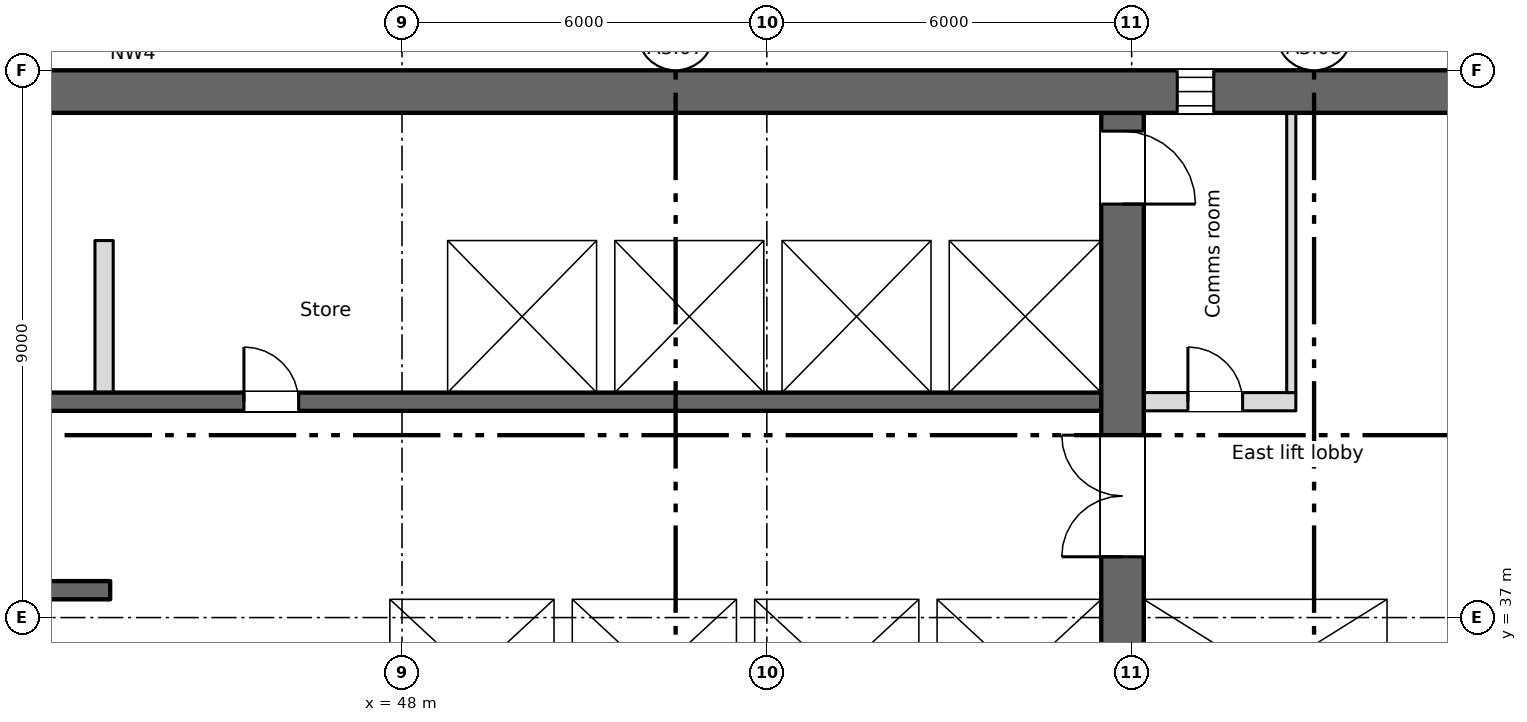
"""IFC4 building model, lengths in metres.
Left out: names, types, materials, properties, quantities, classifications, styles, units other than length and angle.
Written with IfcOpenShell. Run it as: python <this file> out.ifc"""

import sys

from ifc_helpers import new_model, si_unit, direction, frame, frame_2d, origin, place, context, subcontext, project, spatial, rectangle, extrude, element, fill, save


model = new_model("IFC4")
c1 = context("Model", 3, precision=1e-05, world=origin(), true_north=direction((0.0, 1.0)))
c2 = subcontext(c1, "Body", "Model", "MODEL_VIEW")
j1 = project(units=[si_unit("LENGTHUNIT", "METRE"), si_unit("PLANEANGLEUNIT", "RADIAN")], contexts=[c1])
p1 = place(None, origin())
s1 = spatial("IfcSite", under=j1, at=p1, CompositionType="ELEMENT")
p2 = place(p1, origin())
s2 = spatial("IfcBuilding", under=s1, at=p2, CompositionType="ELEMENT")
p3 = place(p2, frame((0.0, 0.0, 185.5)))
s3 = spatial("IfcBuildingStorey", under=s2, at=p3, CompositionType="ELEMENT", Elevation=185.5)
p4 = place(p3, frame((11.55, 45.65, 0.0), z_axis=(0.0, 0.0, 1.0), x_axis=(1.0, 0.0, 0.0)))
e1 = element("IfcWall", 1, at=p4, inside=s3, PredefinedType="SHEAR", context=c2, shape_type="SweptSolid", body=[
    extrude(rectangle(XDim=54.9, YDim=0.7, at=frame_2d((27.45, 0.0))), origin(), (0.0, 0.0, 1.0), 3.35),
])
p5 = place(p4, frame((1.2, 0.0, 0.6)))
e2 = element("IfcOpeningElement", 2, at=p5, cuts=e1, PredefinedType="OPENING", context=c2, shape_type="SweptSolid", body=[
    extrude(rectangle(XDim=0.6, YDim=2.4, at=frame_2d((0.3, 1.2))), frame((0.0, 0.36, 0.0), z_axis=(0.0, -1.0, 0.0), x_axis=(1.0, 0.0, 0.0)), (0.0, 0.0, 1.0), 0.72),
])
p6 = place(p4, frame((49.2, 0.0, 0.6)))
e3 = element("IfcOpeningElement", 3, at=p6, cuts=e1, PredefinedType="OPENING", context=c2, shape_type="SweptSolid", body=[
    extrude(rectangle(XDim=0.6, YDim=2.4, at=frame_2d((0.3, 1.2))), frame((0.0, 0.36, 0.0), z_axis=(0.0, -1.0, 0.0), x_axis=(1.0, 0.0, 0.0)), (0.0, 0.0, 1.0), 0.72),
])
p7 = place(p3, frame((64.35, 34.8, 0.0), z_axis=(0.0, 0.0, 1.0), x_axis=(0.0, 1.0, 0.0)))
e4 = element("IfcWall", 4, at=p7, inside=s3, PredefinedType="SHEAR", context=c2, shape_type="SweptSolid", body=[
    extrude(rectangle(XDim=10.5, YDim=0.3, at=frame_2d((5.25, 0.0))), origin(), (0.0, 0.0, 1.0), 3.35),
])
p8 = place(p3, frame((59.85, 28.4, 0.0), z_axis=(0.0, 0.0, 1.0), x_axis=(0.0, 1.0, 0.0)))
e5 = element("IfcWall", 5, at=p8, inside=s3, PredefinedType="SHEAR", context=c2, shape_type="SweptSolid", body=[
    extrude(rectangle(XDim=16.9, YDim=0.7, at=frame_2d((8.45, 0.0))), origin(), (0.0, 0.0, 1.0), 3.35),
])
p9 = place(p8, frame((9.6, 0.0, 0.0)))
e6 = element("IfcOpeningElement", 6, at=p9, cuts=e5, PredefinedType="OPENING", context=c2, shape_type="SweptSolid", body=[
    extrude(rectangle(XDim=2.0, YDim=2.1, at=frame_2d((1.0, 1.05))), frame((0.0, 0.36, 0.0), z_axis=(0.0, -1.0, 0.0), x_axis=(1.0, 0.0, 0.0)), (0.0, 0.0, 1.0), 0.72),
])
p10 = place(p8, frame((15.4, 0.0, 0.0)))
e7 = element("IfcOpeningElement", 7, at=p10, cuts=e5, PredefinedType="OPENING", context=c2, shape_type="SweptSolid", body=[
    extrude(rectangle(XDim=1.2, YDim=2.1, at=frame_2d((0.6, 1.05))), frame((0.0, 0.36, 0.0), z_axis=(0.0, -1.0, 0.0), x_axis=(1.0, 0.0, 0.0)), (0.0, 0.0, 1.0), 0.72),
])
p11 = place(p3, frame((43.2, 37.45, 0.0), z_axis=(0.0, 0.0, 1.0), x_axis=(-1.0, 0.0, 0.0)))
e8 = element("IfcWall", 8, at=p11, inside=s3, PredefinedType="SHEAR", context=c2, shape_type="SweptSolid", body=[
    extrude(rectangle(XDim=8.4, YDim=0.3, at=frame_2d((4.2, 0.0))), origin(), (0.0, 0.0, 1.0), 3.35),
])
p12 = place(p11, frame((3.75, 0.0, 0.0)))
e9 = element("IfcOpeningElement", 9, at=p12, cuts=e8, PredefinedType="OPENING", context=c2, shape_type="SweptSolid", body=[
    extrude(rectangle(XDim=0.9, YDim=2.1, at=frame_2d((0.45, 1.05))), frame((0.0, 0.16, 0.0), z_axis=(0.0, -1.0, 0.0), x_axis=(1.0, 0.0, 0.0)), (0.0, 0.0, 1.0), 0.32),
])
p13 = place(p3, frame((47.3, 37.45, 0.0), z_axis=(0.0, 0.0, 1.0), x_axis=(1.0, 0.0, 0.0)))
e10 = element("IfcWall", 10, at=p13, inside=s3, PredefinedType="SHEAR", context=c2, shape_type="SweptSolid", body=[
    extrude(rectangle(XDim=12.2, YDim=0.3, at=frame_2d((6.1, 0.0))), origin(), (0.0, 0.0, 1.0), 3.35),
])
p14 = place(p13, frame((4.3, 0.0, 0.0)))
e11 = element("IfcOpeningElement", 11, at=p14, cuts=e10, PredefinedType="OPENING", context=c2, shape_type="SweptSolid", body=[
    extrude(rectangle(XDim=1.1, YDim=2.1, at=frame_2d((0.55, 1.05))), frame((0.0, 0.16, 0.0), z_axis=(0.0, -1.0, 0.0), x_axis=(1.0, 0.0, 0.0)), (0.0, 0.0, 1.0), 0.32),
])
p15 = place(p13, frame((7.3, 0.0, 0.0)))
e12 = element("IfcOpeningElement", 12, at=p15, cuts=e10, PredefinedType="OPENING", context=c2, shape_type="SweptSolid", body=[
    extrude(rectangle(XDim=1.1, YDim=2.1, at=frame_2d((0.55, 1.05))), frame((0.0, 0.16, 0.0), z_axis=(0.0, -1.0, 0.0), x_axis=(1.0, 0.0, 0.0)), (0.0, 0.0, 1.0), 0.32),
])
p16 = place(p13, frame((10.3, 0.0, 0.0)))
e13 = element("IfcOpeningElement", 13, at=p16, cuts=e10, PredefinedType="OPENING", context=c2, shape_type="SweptSolid", body=[
    extrude(rectangle(XDim=1.1, YDim=2.1, at=frame_2d((0.55, 1.05))), frame((0.0, 0.16, 0.0), z_axis=(0.0, -1.0, 0.0), x_axis=(1.0, 0.0, 0.0)), (0.0, 0.0, 1.0), 0.32),
])
p17 = place(p3, frame((60.2, 37.45, 0.0), z_axis=(0.0, 0.0, 1.0), x_axis=(1.0, 0.0, 0.0)))
e14 = element("IfcWall", 14, at=p17, inside=s3, PredefinedType="SHEAR", context=c2, shape_type="SweptSolid", body=[
    extrude(rectangle(XDim=4.0, YDim=0.3, at=frame_2d((2.0, 0.0))), origin(), (0.0, 0.0, 1.0), 3.35),
])
p18 = place(p17, frame((1.45, 0.0, 0.0)))
e15 = element("IfcOpeningElement", 15, at=p18, cuts=e14, PredefinedType="OPENING", context=c2, shape_type="SweptSolid", body=[
    extrude(rectangle(XDim=1.1, YDim=2.1, at=frame_2d((0.55, 1.05))), frame((0.0, 0.16, 0.0), z_axis=(0.0, -1.0, 0.0), x_axis=(1.0, 0.0, 0.0)), (0.0, 0.0, 1.0), 0.32),
])
p19 = place(p3, frame((43.05, 34.8, 0.0), z_axis=(0.0, 0.0, 1.0), x_axis=(0.0, 1.0, 0.0)))
e16 = element("IfcWall", 16, at=p19, inside=s3, PredefinedType="SHEAR", context=c2, shape_type="SweptSolid", body=[
    extrude(rectangle(XDim=2.5, YDim=0.3, at=frame_2d((1.25, 0.0))), origin(), (0.0, 0.0, 1.0), 3.35),
])
p20 = place(p3, frame((47.55, 34.8, 0.0), z_axis=(0.0, 0.0, 1.0), x_axis=(0.0, 1.0, 0.0)))
e17 = element("IfcWall", 17, at=p20, inside=s3, PredefinedType="SHEAR", context=c2, shape_type="SweptSolid", body=[
    extrude(rectangle(XDim=2.5, YDim=0.5, at=frame_2d((1.25, 0.0))), origin(), (0.0, 0.0, 1.0), 3.35),
])
p21 = place(p3, frame((50.65, 34.8, 0.0), z_axis=(0.0, 0.0, 1.0), x_axis=(0.0, 1.0, 0.0)))
e18 = element("IfcWall", 18, at=p21, inside=s3, PredefinedType="SHEAR", context=c2, shape_type="SweptSolid", body=[
    extrude(rectangle(XDim=2.5, YDim=0.3, at=frame_2d((1.25, 0.0))), origin(), (0.0, 0.0, 1.0), 3.35),
])
p22 = place(p3, frame((18.5, 40.55, 0.0), z_axis=(0.0, 0.0, 1.0), x_axis=(1.0, 0.0, 0.0)))
e19 = element("IfcWall", 19, at=p22, inside=s3, PredefinedType="SHEAR", context=c2, shape_type="SweptSolid", body=[
    extrude(rectangle(XDim=41.0, YDim=0.3, at=frame_2d((20.5, 0.0))), origin(), (0.0, 0.0, 1.0), 3.35),
])
p23 = place(p22, frame((2.15, 0.0, 0.0)))
e20 = element("IfcOpeningElement", 20, at=p23, cuts=e19, PredefinedType="OPENING", context=c2, shape_type="SweptSolid", body=[
    extrude(rectangle(XDim=0.9, YDim=2.1, at=frame_2d((0.45, 1.05))), frame((0.0, 0.16, 0.0), z_axis=(0.0, -1.0, 0.0), x_axis=(1.0, 0.0, 0.0)), (0.0, 0.0, 1.0), 0.32),
])
p24 = place(p22, frame((15.9, 0.0, 0.0)))
e21 = element("IfcOpeningElement", 21, at=p24, cuts=e19, PredefinedType="OPENING", context=c2, shape_type="SweptSolid", body=[
    extrude(rectangle(XDim=0.9, YDim=2.1, at=frame_2d((0.45, 1.05))), frame((0.0, 0.16, 0.0), z_axis=(0.0, -1.0, 0.0), x_axis=(1.0, 0.0, 0.0)), (0.0, 0.0, 1.0), 0.32),
])
p25 = place(p22, frame((21.4, 0.0, 0.0)))
e22 = element("IfcOpeningElement", 22, at=p25, cuts=e19, PredefinedType="OPENING", context=c2, shape_type="SweptSolid", body=[
    extrude(rectangle(XDim=0.9, YDim=2.1, at=frame_2d((0.45, 1.05))), frame((0.0, 0.16, 0.0), z_axis=(0.0, -1.0, 0.0), x_axis=(1.0, 0.0, 0.0)), (0.0, 0.0, 1.0), 0.32),
])
p26 = place(p22, frame((26.9, 0.0, 0.0)))
e23 = element("IfcOpeningElement", 23, at=p26, cuts=e19, PredefinedType="OPENING", context=c2, shape_type="SweptSolid", body=[
    extrude(rectangle(XDim=0.9, YDim=2.1, at=frame_2d((0.45, 1.05))), frame((0.0, 0.16, 0.0), z_axis=(0.0, -1.0, 0.0), x_axis=(1.0, 0.0, 0.0)), (0.0, 0.0, 1.0), 0.32),
])
p27 = place(p22, frame((6.175, 0.0, 0.0)))
e24 = element("IfcOpeningElement", 24, at=p27, cuts=e19, PredefinedType="OPENING", context=c2, shape_type="SweptSolid", body=[
    extrude(rectangle(XDim=1.1, YDim=2.1, at=frame_2d((0.55, 1.05))), frame((0.0, 0.16, 0.0), z_axis=(0.0, -1.0, 0.0), x_axis=(1.0, 0.0, 0.0)), (0.0, 0.0, 1.0), 0.32),
])
p28 = place(p22, frame((8.925, 0.0, 0.0)))
e25 = element("IfcOpeningElement", 25, at=p28, cuts=e19, PredefinedType="OPENING", context=c2, shape_type="SweptSolid", body=[
    extrude(rectangle(XDim=1.1, YDim=2.1, at=frame_2d((0.55, 1.05))), frame((0.0, 0.16, 0.0), z_axis=(0.0, -1.0, 0.0), x_axis=(1.0, 0.0, 0.0)), (0.0, 0.0, 1.0), 0.32),
])
p29 = place(p22, frame((11.675, 0.0, 0.0)))
e26 = element("IfcOpeningElement", 26, at=p29, cuts=e19, PredefinedType="OPENING", context=c2, shape_type="SweptSolid", body=[
    extrude(rectangle(XDim=1.1, YDim=2.1, at=frame_2d((0.55, 1.05))), frame((0.0, 0.16, 0.0), z_axis=(0.0, -1.0, 0.0), x_axis=(1.0, 0.0, 0.0)), (0.0, 0.0, 1.0), 0.32),
])
p30 = place(p22, frame((30.925, 0.0, 0.0)))
e27 = element("IfcOpeningElement", 27, at=p30, cuts=e19, PredefinedType="OPENING", context=c2, shape_type="SweptSolid", body=[
    extrude(rectangle(XDim=1.1, YDim=2.1, at=frame_2d((0.55, 1.05))), frame((0.0, 0.16, 0.0), z_axis=(0.0, -1.0, 0.0), x_axis=(1.0, 0.0, 0.0)), (0.0, 0.0, 1.0), 0.32),
])
p31 = place(p22, frame((33.675, 0.0, 0.0)))
e28 = element("IfcOpeningElement", 28, at=p31, cuts=e19, PredefinedType="OPENING", context=c2, shape_type="SweptSolid", body=[
    extrude(rectangle(XDim=1.1, YDim=2.1, at=frame_2d((0.55, 1.05))), frame((0.0, 0.16, 0.0), z_axis=(0.0, -1.0, 0.0), x_axis=(1.0, 0.0, 0.0)), (0.0, 0.0, 1.0), 0.32),
])
p32 = place(p22, frame((36.375, 0.0, 0.0)))
e29 = element("IfcOpeningElement", 29, at=p32, cuts=e19, PredefinedType="OPENING", context=c2, shape_type="SweptSolid", body=[
    extrude(rectangle(XDim=1.2, YDim=2.1, at=frame_2d((0.6, 1.05))), frame((0.0, 0.16, 0.0), z_axis=(0.0, -1.0, 0.0), x_axis=(1.0, 0.0, 0.0)), (0.0, 0.0, 1.0), 0.32),
])
p33 = place(p22, frame((39.15, 0.0, 0.0)))
e30 = element("IfcOpeningElement", 30, at=p33, cuts=e19, PredefinedType="OPENING", context=c2, shape_type="SweptSolid", body=[
    extrude(rectangle(XDim=1.2, YDim=2.1, at=frame_2d((0.6, 1.05))), frame((0.0, 0.16, 0.0), z_axis=(0.0, -1.0, 0.0), x_axis=(1.0, 0.0, 0.0)), (0.0, 0.0, 1.0), 0.32),
])
p34 = place(p3, frame((18.5, 43.35, 0.0), z_axis=(0.0, 0.0, 1.0), x_axis=(1.0, 0.0, 0.0)))
e31 = element("IfcWall", 31, at=p34, inside=s3, PredefinedType="SHEAR", context=c2, shape_type="SweptSolid", body=[
    extrude(rectangle(XDim=41.0, YDim=0.3, at=frame_2d((20.5, 0.0))), origin(), (0.0, 0.0, 1.0), 3.35),
])
p35 = place(p3, frame((60.2, 40.55, 0.0), z_axis=(0.0, 0.0, 1.0), x_axis=(1.0, 0.0, 0.0)))
e32 = element("IfcWall", 32, at=p35, inside=s3, PredefinedType="PARTITIONING", context=c2, shape_type="SweptSolid", body=[
    extrude(rectangle(XDim=2.5, YDim=0.3, at=frame_2d((1.25, 0.0))), origin(), (0.0, 0.0, 1.0), 3.35),
])
p36 = place(p35, frame((0.725, 0.0, 0.0)))
e33 = element("IfcOpeningElement", 33, at=p36, cuts=e32, PredefinedType="OPENING", context=c2, shape_type="SweptSolid", body=[
    extrude(rectangle(XDim=0.9, YDim=2.1, at=frame_2d((0.45, 1.05))), frame((0.0, 0.16, 0.0), z_axis=(0.0, -1.0, 0.0), x_axis=(1.0, 0.0, 0.0)), (0.0, 0.0, 1.0), 0.32),
])
for number, where, z_axis, x_axis in (
    (34, (53.65, 34.8, 0.0), (0.0, 0.0, 1.0), (0.0, 1.0, 0.0)),
    (35, (56.65, 34.8, 0.0), (0.0, 0.0, 1.0), (0.0, 1.0, 0.0)),
    (36, (48.6, 40.7, 0.0), (0.0, 0.0, 1.0), (0.0, 1.0, 0.0)),
    (37, (51.35, 40.7, 0.0), (0.0, 0.0, 1.0), (0.0, 1.0, 0.0)),
    (38, (54.1, 40.7, 0.0), (0.0, 0.0, 1.0), (0.0, 1.0, 0.0)),
    (39, (56.85, 40.7, 0.0), (0.0, 0.0, 1.0), (0.0, 1.0, 0.0)),
):
    element("IfcWall", number, at=place(p3, frame(where, z_axis=z_axis, x_axis=x_axis)), inside=s3, PredefinedType="SHEAR", context=c2, shape_type="SweptSolid", body=[
        extrude(rectangle(XDim=2.5, YDim=0.3, at=frame_2d((1.25, 0.0))), origin(), (0.0, 0.0, 1.0), 3.35),
    ])
p37 = place(p3, frame((62.625, 40.7, 0.0), z_axis=(0.0, 0.0, 1.0), x_axis=(0.0, 1.0, 0.0)))
e40 = element("IfcWall", 40, at=p37, inside=s3, PredefinedType="PARTITIONING", context=c2, shape_type="SweptSolid", body=[
    extrude(rectangle(XDim=4.6, YDim=0.15, at=frame_2d((2.3, 0.0))), origin(), (0.0, 0.0, 1.0), 3.35),
])
p38 = place(p3, frame((43.1, 40.7, 0.0), z_axis=(0.0, 0.0, 1.0), x_axis=(0.0, 1.0, 0.0)))
e41 = element("IfcWall", 41, at=p38, inside=s3, PredefinedType="PARTITIONING", context=c2, shape_type="SweptSolid", body=[
    extrude(rectangle(XDim=2.5, YDim=0.3, at=frame_2d((1.25, 0.0))), origin(), (0.0, 0.0, 1.0), 3.35),
])
p39 = place(p6, origin())
e42 = element("IfcWindow", 42, at=p39, inside=s3, PartitioningType="SINGLE_PANEL", PredefinedType="WINDOW", context=c2, shape_type="SweptSolid", body=[
    extrude(rectangle(XDim=0.6, YDim=2.4, at=frame_2d((0.3, 1.2))), frame((0.0, 0.03, 0.0), z_axis=(0.0, -1.0, 0.0), x_axis=(1.0, 0.0, 0.0)), (0.0, 0.0, 1.0), 0.06),
])
fill(e3, e42)
p40 = place(p36, origin())
e43 = element("IfcDoor", 43, at=p40, inside=s3, OperationType="SINGLE_SWING_LEFT", PredefinedType="DOOR", context=c2, shape_type="SweptSolid", body=[
    extrude(rectangle(XDim=0.9, YDim=2.1, at=frame_2d((0.45, 1.05))), frame((0.0, 0.025, 0.0), z_axis=(0.0, -1.0, 0.0), x_axis=(1.0, 0.0, 0.0)), (0.0, 0.0, 1.0), 0.05),
])
fill(e33, e43)
p41 = place(p26, origin())
e44 = element("IfcDoor", 44, at=p41, inside=s3, OperationType="SINGLE_SWING_LEFT", PredefinedType="DOOR", context=c2, shape_type="SweptSolid", body=[
    extrude(rectangle(XDim=0.9, YDim=2.1, at=frame_2d((0.45, 1.05))), frame((0.0, 0.025, 0.0), z_axis=(0.0, -1.0, 0.0), x_axis=(1.0, 0.0, 0.0)), (0.0, 0.0, 1.0), 0.05),
])
fill(e23, e44)
p42 = place(p14, origin())
e45 = element("IfcDoor", 45, at=p42, inside=s3, OperationType="SLIDING_TO_LEFT", PredefinedType="DOOR", context=c2, shape_type="SweptSolid", body=[
    extrude(rectangle(XDim=1.1, YDim=2.1, at=frame_2d((0.55, 1.05))), frame((0.0, 0.025, 0.0), z_axis=(0.0, -1.0, 0.0), x_axis=(1.0, 0.0, 0.0)), (0.0, 0.0, 1.0), 0.05),
])
fill(e11, e45)
p43 = place(p15, origin())
e46 = element("IfcDoor", 46, at=p43, inside=s3, OperationType="SLIDING_TO_LEFT", PredefinedType="DOOR", context=c2, shape_type="SweptSolid", body=[
    extrude(rectangle(XDim=1.1, YDim=2.1, at=frame_2d((0.55, 1.05))), frame((0.0, 0.025, 0.0), z_axis=(0.0, -1.0, 0.0), x_axis=(1.0, 0.0, 0.0)), (0.0, 0.0, 1.0), 0.05),
])
fill(e12, e46)
p44 = place(p16, origin())
e47 = element("IfcDoor", 47, at=p44, inside=s3, OperationType="SLIDING_TO_LEFT", PredefinedType="DOOR", context=c2, shape_type="SweptSolid", body=[
    extrude(rectangle(XDim=1.1, YDim=2.1, at=frame_2d((0.55, 1.05))), frame((0.0, 0.025, 0.0), z_axis=(0.0, -1.0, 0.0), x_axis=(1.0, 0.0, 0.0)), (0.0, 0.0, 1.0), 0.05),
])
fill(e13, e47)
p45 = place(p30, origin())
e48 = element("IfcDoor", 48, at=p45, inside=s3, OperationType="SLIDING_TO_LEFT", PredefinedType="DOOR", context=c2, shape_type="SweptSolid", body=[
    extrude(rectangle(XDim=1.1, YDim=2.1, at=frame_2d((0.55, 1.05))), frame((0.0, 0.025, 0.0), z_axis=(0.0, -1.0, 0.0), x_axis=(1.0, 0.0, 0.0)), (0.0, 0.0, 1.0), 0.05),
])
fill(e27, e48)
p46 = place(p31, origin())
e49 = element("IfcDoor", 49, at=p46, inside=s3, OperationType="SLIDING_TO_LEFT", PredefinedType="DOOR", context=c2, shape_type="SweptSolid", body=[
    extrude(rectangle(XDim=1.1, YDim=2.1, at=frame_2d((0.55, 1.05))), frame((0.0, 0.025, 0.0), z_axis=(0.0, -1.0, 0.0), x_axis=(1.0, 0.0, 0.0)), (0.0, 0.0, 1.0), 0.05),
])
fill(e28, e49)
p47 = place(p32, origin())
e50 = element("IfcDoor", 50, at=p47, inside=s3, OperationType="SLIDING_TO_LEFT", PredefinedType="DOOR", context=c2, shape_type="SweptSolid", body=[
    extrude(rectangle(XDim=1.2, YDim=2.1, at=frame_2d((0.6, 1.05))), frame((0.0, 0.025, 0.0), z_axis=(0.0, -1.0, 0.0), x_axis=(1.0, 0.0, 0.0)), (0.0, 0.0, 1.0), 0.05),
])
fill(e29, e50)
p48 = place(p33, origin())
e51 = element("IfcDoor", 51, at=p48, inside=s3, OperationType="SLIDING_TO_LEFT", PredefinedType="DOOR", context=c2, shape_type="SweptSolid", body=[
    extrude(rectangle(XDim=1.2, YDim=2.1, at=frame_2d((0.6, 1.05))), frame((0.0, 0.025, 0.0), z_axis=(0.0, -1.0, 0.0), x_axis=(1.0, 0.0, 0.0)), (0.0, 0.0, 1.0), 0.05),
])
fill(e30, e51)
p49 = place(p18, origin())
e52 = element("IfcDoor", 52, at=p49, inside=s3, OperationType="SLIDING_TO_LEFT", PredefinedType="DOOR", context=c2, shape_type="SweptSolid", body=[
    extrude(rectangle(XDim=1.1, YDim=2.1, at=frame_2d((0.55, 1.05))), frame((0.0, 0.025, 0.0), z_axis=(0.0, -1.0, 0.0), x_axis=(1.0, 0.0, 0.0)), (0.0, 0.0, 1.0), 0.05),
])
fill(e15, e52)
p50 = place(p9, origin())
e53 = element("IfcDoor", 53, at=p50, inside=s3, OperationType="DOUBLE_DOOR_SINGLE_SWING", PredefinedType="DOOR", context=c2, shape_type="SweptSolid", body=[
    extrude(rectangle(XDim=2.0, YDim=2.1, at=frame_2d((1.0, 1.05))), frame((0.0, 0.025, 0.0), z_axis=(0.0, -1.0, 0.0), x_axis=(1.0, 0.0, 0.0)), (0.0, 0.0, 1.0), 0.05),
])
fill(e6, e53)
p51 = place(p10, origin())
e54 = element("IfcDoor", 54, at=p51, inside=s3, OperationType="SINGLE_SWING_LEFT", PredefinedType="DOOR", context=c2, shape_type="SweptSolid", body=[
    extrude(rectangle(XDim=1.2, YDim=2.1, at=frame_2d((0.6, 1.05))), frame((0.0, 0.025, 0.0), z_axis=(0.0, -1.0, 0.0), x_axis=(1.0, 0.0, 0.0)), (0.0, 0.0, 1.0), 0.05),
])
fill(e7, e54)
save(model, sys.argv[1])
